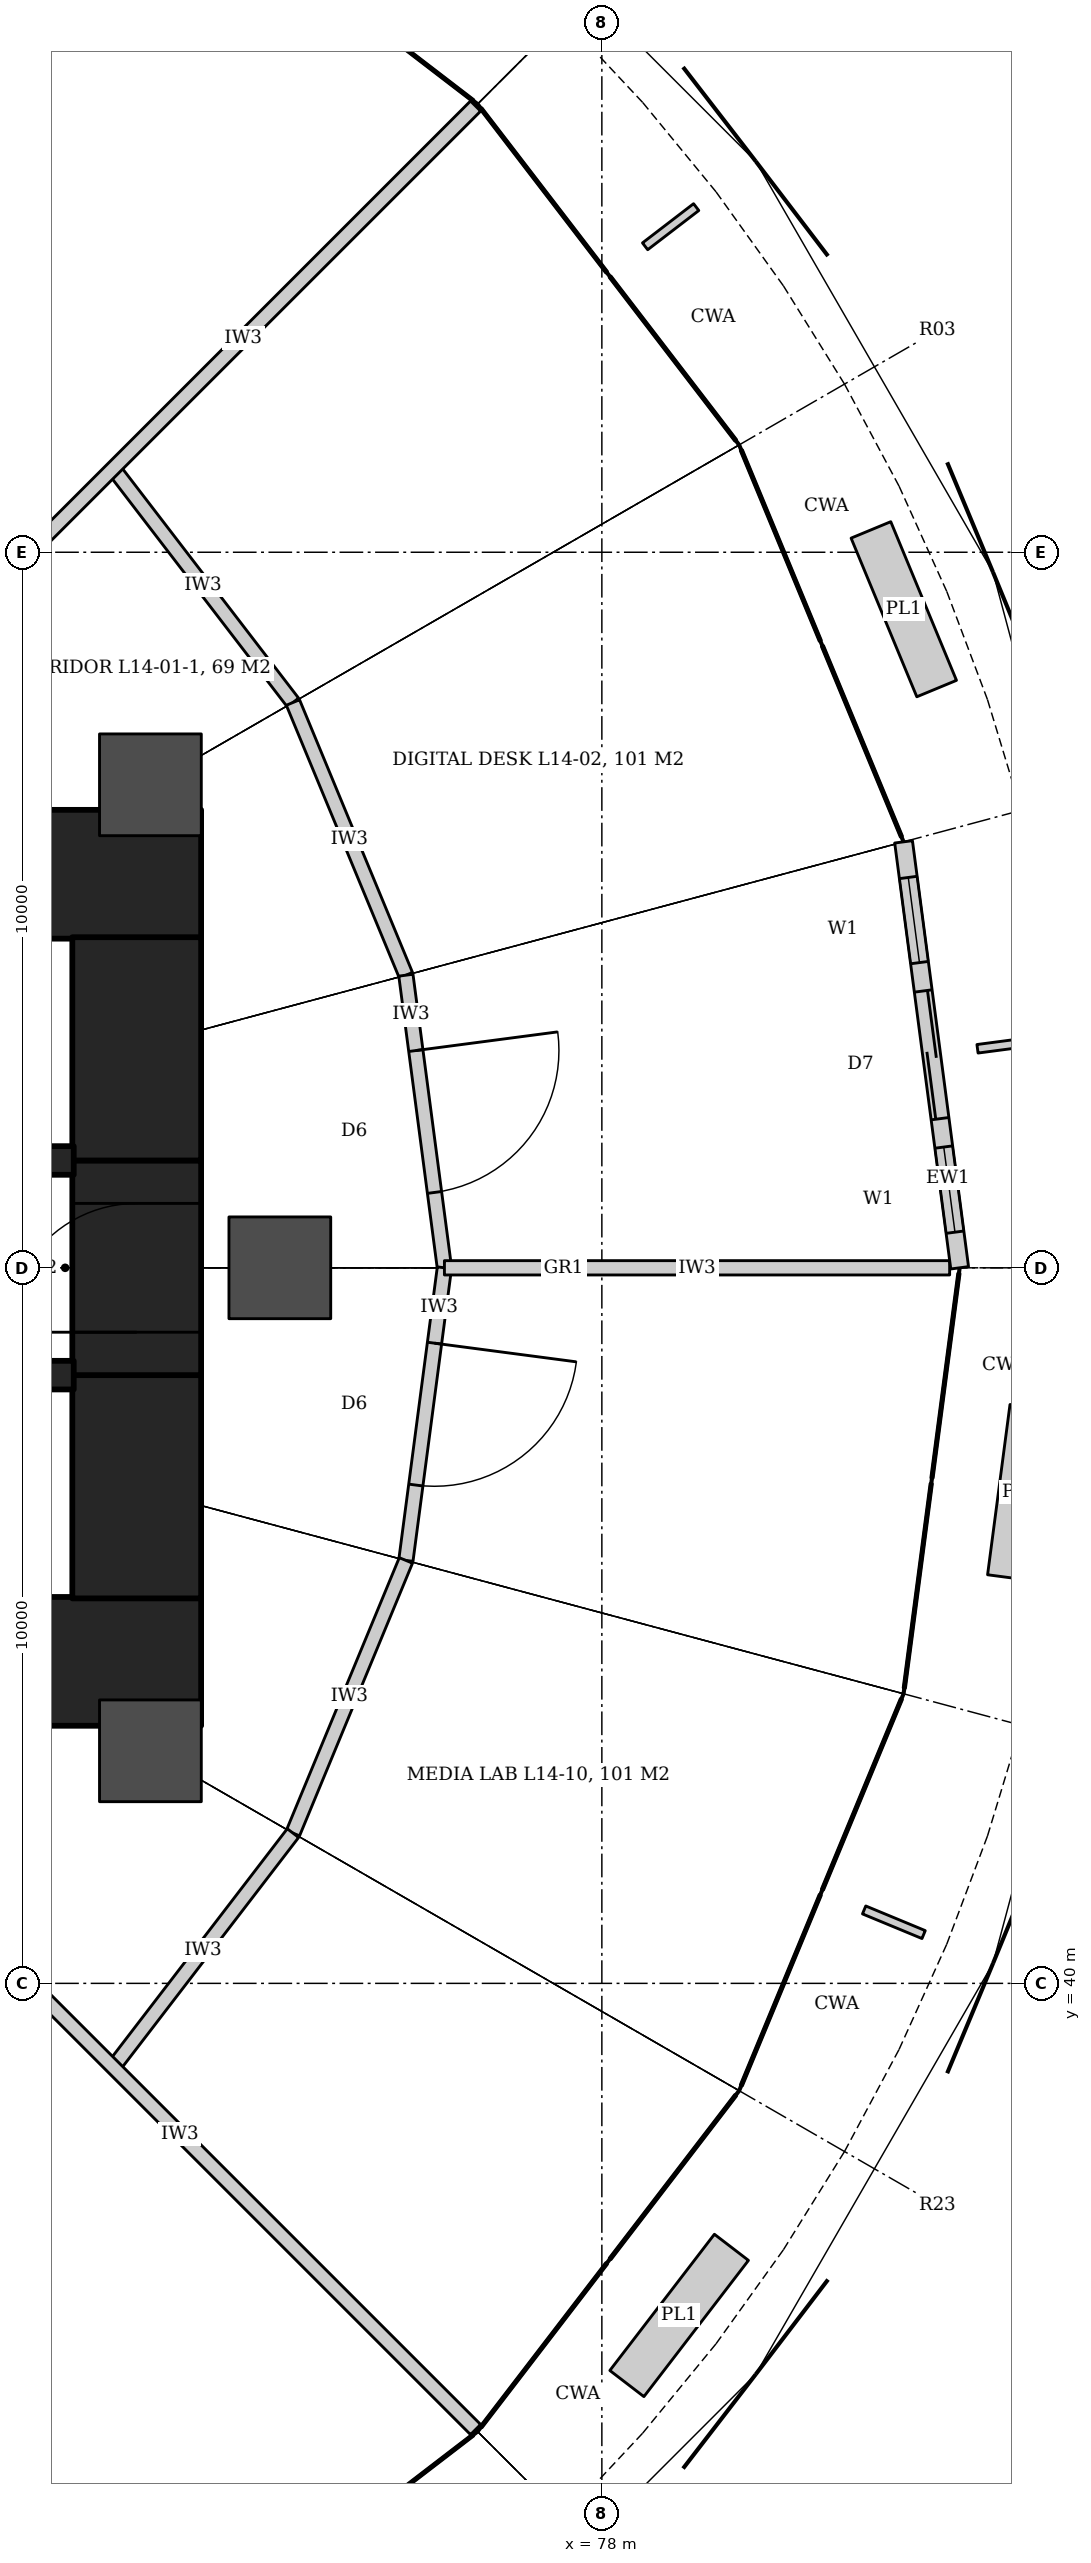
"""IFC4 building model, lengths in metres.
Left out: names, types, materials, properties, quantities, classifications, styles, units other than length and angle.
Written with IfcOpenShell. Run it as: python <this file> out.ifc"""

import sys

from ifc_helpers import new_model, si_unit, direction, frame, frame_2d, origin, origin_2d, place, context, subcontext, project, spatial, rectangle, hollow_circle, extrude, element, fill, save


model = new_model("IFC4")
c1 = context("Model", 3, precision=1e-05, world=origin(), true_north=direction((0.0, 1.0)))
c2 = subcontext(c1, "Body", "Model", "MODEL_VIEW")
j1 = project(units=[si_unit("LENGTHUNIT", "METRE"), si_unit("PLANEANGLEUNIT", "RADIAN")], contexts=[c1])
p1 = place(None, origin())
s1 = spatial("IfcSite", under=j1, at=p1, CompositionType="ELEMENT")
p2 = place(p1, origin())
s2 = spatial("IfcBuilding", under=s1, at=p2, CompositionType="ELEMENT")
p3 = place(p2, frame((0.0, 0.0, 68.0)))
s3 = spatial("IfcBuildingStorey", under=s2, at=p3, CompositionType="ELEMENT", Elevation=68.0)
for number, where, z_axis, x_axis in (
    (1, (64.6, 55.5, 0.0), (0.0, 0.0, 1.0), (1.0, 0.0, 0.0)),
    (2, (64.6, 44.5, 0.0), (0.0, 0.0, 1.0), (1.0, 0.0, 0.0)),
):
    element("IfcWall", number, at=place(p3, frame(where, z_axis=z_axis, x_axis=x_axis)), inside=s3, PredefinedType="SHEAR", context=c2, shape_type="SweptSolid", body=[
        extrude(rectangle(XDim=7.8, YDim=1.8, at=frame_2d((3.9, 0.0))), origin(), (0.0, 0.0, 1.0), 4.2),
    ])
p4 = place(p3, frame((71.5, 45.38, 0.0), z_axis=(0.0, 0.0, 1.0), x_axis=(0.0, 1.0, 0.0)))
e3 = element("IfcWall", 3, at=p4, inside=s3, PredefinedType="SHEAR", context=c2, shape_type="SweptSolid", body=[
    extrude(rectangle(XDim=3.12, YDim=1.8, at=frame_2d((1.56, 0.0))), origin(), (0.0, 0.0, 1.0), 4.2),
])
p5 = place(p3, frame((71.5, 48.5, 0.0), z_axis=(0.0, 0.0, 1.0), x_axis=(0.0, 1.0, 0.0)))
e4 = element("IfcWall", 4, at=p5, inside=s3, PredefinedType="SHEAR", context=c2, shape_type="SweptSolid", body=[
    extrude(rectangle(XDim=3.0, YDim=1.8, at=frame_2d((1.5, 0.0))), origin(), (0.0, 0.0, 1.0), 4.2),
])
p6 = place(p5, frame((0.6, 0.0, 0.0)))
e5 = element("IfcOpeningElement", 5, at=p6, cuts=e4, PredefinedType="OPENING", context=c2, shape_type="SweptSolid", body=[
    extrude(rectangle(XDim=1.8, YDim=2.1, at=frame_2d((0.9, 1.05))), frame((0.0, 0.91, 0.0), z_axis=(0.0, -1.0, 0.0), x_axis=(1.0, 0.0, 0.0)), (0.0, 0.0, 1.0), 1.82),
])
p7 = place(p3, frame((71.5, 51.5, 0.0), z_axis=(0.0, 0.0, 1.0), x_axis=(0.0, 1.0, 0.0)))
e6 = element("IfcWall", 6, at=p7, inside=s3, PredefinedType="SHEAR", context=c2, shape_type="SweptSolid", body=[
    extrude(rectangle(XDim=3.12, YDim=1.8, at=frame_2d((1.56, 0.0))), origin(), (0.0, 0.0, 1.0), 4.2),
])
p8 = place(p3, frame((64.6, 51.5, 0.0), z_axis=(0.0, 0.0, 1.0), x_axis=(1.0, 0.0, 0.0)))
e7 = element("IfcWall", 7, at=p8, inside=s3, PredefinedType="SHEAR", context=c2, shape_type="SweptSolid", body=[
    extrude(rectangle(XDim=6.02, YDim=0.4, at=frame_2d((3.01, 0.0))), origin(), (0.0, 0.0, 1.0), 4.2),
])
p9 = place(p8, frame((1.0, 0.0, 0.0)))
e8 = element("IfcOpeningElement", 8, at=p9, cuts=e7, PredefinedType="OPENING", context=c2, shape_type="SweptSolid", body=[
    extrude(rectangle(XDim=1.2, YDim=2.1, at=frame_2d((0.6, 1.05))), frame((0.0, 0.21, 0.0), z_axis=(0.0, -1.0, 0.0), x_axis=(1.0, 0.0, 0.0)), (0.0, 0.0, 1.0), 0.42),
])
p10 = place(p8, frame((4.2, 0.0, 0.0)))
e9 = element("IfcOpeningElement", 9, at=p10, cuts=e7, PredefinedType="OPENING", context=c2, shape_type="SweptSolid", body=[
    extrude(rectangle(XDim=1.2, YDim=2.1, at=frame_2d((0.6, 1.05))), frame((0.0, 0.21, 0.0), z_axis=(0.0, -1.0, 0.0), x_axis=(1.0, 0.0, 0.0)), (0.0, 0.0, 1.0), 0.42),
])
p11 = place(p3, frame((64.6, 48.5, 0.0), z_axis=(0.0, 0.0, 1.0), x_axis=(1.0, 0.0, 0.0)))
e10 = element("IfcWall", 10, at=p11, inside=s3, PredefinedType="SHEAR", context=c2, shape_type="SweptSolid", body=[
    extrude(rectangle(XDim=6.02, YDim=0.4, at=frame_2d((3.01, 0.0))), origin(), (0.0, 0.0, 1.0), 4.2),
])
p12 = place(p11, frame((0.5, 0.0, 0.0)))
e11 = element("IfcOpeningElement", 11, at=p12, cuts=e10, PredefinedType="OPENING", context=c2, shape_type="SweptSolid", body=[
    extrude(rectangle(XDim=1.0, YDim=2.1, at=frame_2d((0.5, 1.05))), frame((0.0, 0.21, 0.0), z_axis=(0.0, -1.0, 0.0), x_axis=(1.0, 0.0, 0.0)), (0.0, 0.0, 1.0), 0.42),
])
for number, where, z_axis, x_axis in (
    (12, (73.5, 50.0, 0.0), (0.0, 0.0, 1.0), (1.0, 0.0, 0.0)),
    (13, (71.691, 56.75, 0.0), (0.0, 0.0, 1.0), (1.0, 0.0, 0.0)),
    (14, (71.691, 43.25, 0.0), (0.0, 0.0, 1.0), (1.0, 0.0, 0.0)),
):
    element("IfcColumn", number, at=place(p3, frame(where, z_axis=z_axis, x_axis=x_axis)), inside=s3, PredefinedType="COLUMN", context=c2, shape_type="SweptSolid", body=[
        extrude(hollow_circle(Radius=0.711, WallThickness=0.07, at=origin_2d()), origin(), (0.0, 0.0, 1.0), 4.2),
    ])
p13 = place(p3, frame((71.172, 61.172, 0.0), z_axis=(0.0, 0.0, 1.0), x_axis=(0.608714823874, -0.793389099494, 0.0)))
e15 = element("IfcWall", 15, at=p13, inside=s3, PredefinedType="PARTITIONING", context=c2, shape_type="SweptSolid", body=[
    extrude(rectangle(XDim=4.125, YDim=0.2, at=frame_2d((2.062, 0.0))), origin(), (0.0, 0.0, 1.0), 3.04),
])
p14 = place(p3, frame((73.683, 57.9, 0.0), z_axis=(0.0, 0.0, 1.0), x_axis=(0.382731667114, -0.923859551549, 0.0)))
e16 = element("IfcWall", 16, at=p14, inside=s3, PredefinedType="PARTITIONING", context=c2, shape_type="SweptSolid", body=[
    extrude(rectangle(XDim=4.125, YDim=0.2, at=frame_2d((2.062, 0.0))), origin(), (0.0, 0.0, 1.0), 3.04),
])
p15 = place(p3, frame((75.262, 54.089, 0.0), z_axis=(0.0, 0.0, 1.0), x_axis=(0.130515758099, -0.991446234996, 0.0)))
e17 = element("IfcWall", 17, at=p15, inside=s3, PredefinedType="PARTITIONING", context=c2, shape_type="SweptSolid", body=[
    extrude(rectangle(XDim=4.125, YDim=0.2, at=frame_2d((2.062, 0.0))), origin(), (0.0, 0.0, 1.0), 3.04),
])
p16 = place(p15, frame((1.062, 0.0, 0.0)))
e18 = element("IfcOpeningElement", 18, at=p16, cuts=e17, PredefinedType="OPENING", context=c2, shape_type="SweptSolid", body=[
    extrude(rectangle(XDim=2.0, YDim=2.1, at=frame_2d((1.0, 1.05))), frame((0.0, 0.11, 0.0), z_axis=(0.0, -1.0, 0.0), x_axis=(1.0, 0.0, 0.0)), (0.0, 0.0, 1.0), 0.22),
])
p17 = place(p3, frame((75.8, 50.0, 0.0), z_axis=(0.0, 0.0, 1.0), x_axis=(-0.130515758099, -0.991446234996, 0.0)))
e19 = element("IfcWall", 19, at=p17, inside=s3, PredefinedType="PARTITIONING", context=c2, shape_type="SweptSolid", body=[
    extrude(rectangle(XDim=4.125, YDim=0.2, at=frame_2d((2.062, 0.0))), origin(), (0.0, 0.0, 1.0), 3.04),
])
p18 = place(p17, frame((1.062, 0.0, 0.0)))
e20 = element("IfcOpeningElement", 20, at=p18, cuts=e19, PredefinedType="OPENING", context=c2, shape_type="SweptSolid", body=[
    extrude(rectangle(XDim=2.0, YDim=2.1, at=frame_2d((1.0, 1.05))), frame((0.0, 0.11, 0.0), z_axis=(0.0, -1.0, 0.0), x_axis=(1.0, 0.0, 0.0)), (0.0, 0.0, 1.0), 0.22),
])
p19 = place(p3, frame((75.262, 45.911, 0.0), z_axis=(0.0, 0.0, 1.0), x_axis=(-0.382731667114, -0.923859551549, 0.0)))
e21 = element("IfcWall", 21, at=p19, inside=s3, PredefinedType="PARTITIONING", context=c2, shape_type="SweptSolid", body=[
    extrude(rectangle(XDim=4.125, YDim=0.2, at=frame_2d((2.062, 0.0))), origin(), (0.0, 0.0, 1.0), 3.04),
])
p20 = place(p3, frame((73.683, 42.1, 0.0), z_axis=(0.0, 0.0, 1.0), x_axis=(-0.608714823874, -0.793389099494, 0.0)))
e22 = element("IfcWall", 22, at=p20, inside=s3, PredefinedType="PARTITIONING", context=c2, shape_type="SweptSolid", body=[
    extrude(rectangle(XDim=4.125, YDim=0.2, at=frame_2d((2.062, 0.0))), origin(), (0.0, 0.0, 1.0), 3.04),
])
p21 = place(p3, frame((75.8, 50.0, 0.0), z_axis=(0.0, 0.0, 1.0), x_axis=(1.0, 0.0, 0.0)))
e23 = element("IfcWall", 23, at=p21, inside=s3, PredefinedType="PARTITIONING", context=c2, shape_type="SweptSolid", body=[
    extrude(rectangle(XDim=7.06, YDim=0.2, at=frame_2d((3.53, 0.0))), origin(), (0.0, 0.0, 1.0), 3.04),
])
p22 = place(p3, frame((66.4, 56.4, 0.0), z_axis=(0.0, 0.0, 1.0), x_axis=(0.707106781187, 0.707106781187, 0.0)))
e24 = element("IfcWall", 24, at=p22, inside=s3, PredefinedType="PARTITIONING", context=c2, shape_type="SweptSolid", body=[
    extrude(rectangle(XDim=13.909, YDim=0.2, at=frame_2d((6.955, 0.0))), origin(), (0.0, 0.0, 1.0), 3.02),
])
p23 = place(p22, frame((2.375, 0.0, 0.0)))
e25 = element("IfcOpeningElement", 25, at=p23, cuts=e24, PredefinedType="OPENING", context=c2, shape_type="SweptSolid", body=[
    extrude(rectangle(XDim=2.0, YDim=2.1, at=frame_2d((1.0, 1.05))), frame((0.0, 0.11, 0.0), z_axis=(0.0, -1.0, 0.0), x_axis=(1.0, 0.0, 0.0)), (0.0, 0.0, 1.0), 0.22),
])
p24 = place(p3, frame((66.4, 43.6, 0.0), z_axis=(0.0, 0.0, 1.0), x_axis=(0.707106781187, -0.707106781187, 0.0)))
e26 = element("IfcWall", 26, at=p24, inside=s3, PredefinedType="PARTITIONING", context=c2, shape_type="SweptSolid", body=[
    extrude(rectangle(XDim=13.909, YDim=0.2, at=frame_2d((6.955, 0.0))), origin(), (0.0, 0.0, 1.0), 3.02),
])
p25 = place(p3, frame((83.0, 50.0, 0.0), z_axis=(0.0, 0.0, 1.0), x_axis=(-0.130522880875, 0.991445297315, 0.0)))
e27 = element("IfcWall", 27, at=p25, inside=s3, PredefinedType="SOLIDWALL", context=c2, shape_type="SweptSolid", body=[
    extrude(rectangle(XDim=6.004, YDim=0.25, at=frame_2d((3.002, 0.0))), origin(), (0.0, 0.0, 1.0), 4.04),
])
p26 = place(p25, frame((2.102, 0.0, 0.0)))
e28 = element("IfcOpeningElement", 28, at=p26, cuts=e27, PredefinedType="OPENING", context=c2, shape_type="SweptSolid", body=[
    extrude(rectangle(XDim=1.8, YDim=2.4, at=frame_2d((0.9, 1.2))), frame((0.0, 0.135, 0.0), z_axis=(0.0, -1.0, 0.0), x_axis=(1.0, 0.0, 0.0)), (0.0, 0.0, 1.0), 0.27),
])
p27 = place(p25, frame((0.502, 0.0, 0.0)))
e29 = element("IfcOpeningElement", 29, at=p27, cuts=e27, PredefinedType="OPENING", context=c2, shape_type="SweptSolid", body=[
    extrude(rectangle(XDim=1.2, YDim=2.4, at=frame_2d((0.6, 1.2))), frame((0.0, 0.135, 0.0), z_axis=(0.0, -1.0, 0.0), x_axis=(1.0, 0.0, 0.0)), (0.0, 0.0, 1.0), 0.27),
])
p28 = place(p25, frame((4.302, 0.0, 0.0)))
e30 = element("IfcOpeningElement", 30, at=p28, cuts=e27, PredefinedType="OPENING", context=c2, shape_type="SweptSolid", body=[
    extrude(rectangle(XDim=1.2, YDim=2.4, at=frame_2d((0.6, 1.2))), frame((0.0, 0.135, 0.0), z_axis=(0.0, -1.0, 0.0), x_axis=(1.0, 0.0, 0.0)), (0.0, 0.0, 1.0), 0.27),
])
p29 = place(p16, origin())
e31 = element("IfcDoor", 31, at=p29, inside=s3, OperationType="DOUBLE_DOOR_DOUBLE_SWING", PredefinedType="DOOR", context=c2, shape_type="SweptSolid", body=[
    extrude(rectangle(XDim=2.0, YDim=2.1, at=frame_2d((1.0, 1.05))), frame((0.0, 0.025, 0.0), z_axis=(0.0, -1.0, 0.0), x_axis=(1.0, 0.0, 0.0)), (0.0, 0.0, 1.0), 0.05),
])
fill(e18, e31)
p30 = place(p18, origin())
e32 = element("IfcDoor", 32, at=p30, inside=s3, OperationType="DOUBLE_DOOR_DOUBLE_SWING", PredefinedType="DOOR", context=c2, shape_type="SweptSolid", body=[
    extrude(rectangle(XDim=2.0, YDim=2.1, at=frame_2d((1.0, 1.05))), frame((0.0, 0.025, 0.0), z_axis=(0.0, -1.0, 0.0), x_axis=(1.0, 0.0, 0.0)), (0.0, 0.0, 1.0), 0.05),
])
fill(e20, e32)
p31 = place(p26, origin())
e33 = element("IfcDoor", 33, at=p31, inside=s3, OperationType="DOUBLE_DOOR_SLIDING", PredefinedType="DOOR", context=c2, shape_type="SweptSolid", body=[
    extrude(rectangle(XDim=1.8, YDim=2.4, at=frame_2d((0.9, 1.2))), frame((0.0, 0.025, 0.0), z_axis=(0.0, -1.0, 0.0), x_axis=(1.0, 0.0, 0.0)), (0.0, 0.0, 1.0), 0.05),
])
fill(e28, e33)
p32 = place(p27, origin())
e34 = element("IfcWindow", 34, at=p32, inside=s3, PartitioningType="SINGLE_PANEL", PredefinedType="WINDOW", context=c2, shape_type="SweptSolid", body=[
    extrude(rectangle(XDim=1.2, YDim=2.4, at=frame_2d((0.6, 1.2))), frame((0.0, 0.03, 0.0), z_axis=(0.0, -1.0, 0.0), x_axis=(1.0, 0.0, 0.0)), (0.0, 0.0, 1.0), 0.06),
])
fill(e29, e34)
p33 = place(p28, origin())
e35 = element("IfcWindow", 35, at=p33, inside=s3, PartitioningType="SINGLE_PANEL", PredefinedType="WINDOW", context=c2, shape_type="SweptSolid", body=[
    extrude(rectangle(XDim=1.2, YDim=2.4, at=frame_2d((0.6, 1.2))), frame((0.0, 0.03, 0.0), z_axis=(0.0, -1.0, 0.0), x_axis=(1.0, 0.0, 0.0)), (0.0, 0.0, 1.0), 0.06),
])
fill(e30, e35)
p34 = place(p6, origin())
e36 = element("IfcDoor", 36, at=p34, inside=s3, OperationType="DOUBLE_DOOR_DOUBLE_SWING", PredefinedType="DOOR", context=c2, shape_type="SweptSolid", body=[
    extrude(rectangle(XDim=1.8, YDim=2.1, at=frame_2d((0.9, 1.05))), frame((0.0, 0.025, 0.0), z_axis=(0.0, -1.0, 0.0), x_axis=(1.0, 0.0, 0.0)), (0.0, 0.0, 1.0), 0.05),
])
fill(e5, e36)
save(model, sys.argv[1])
